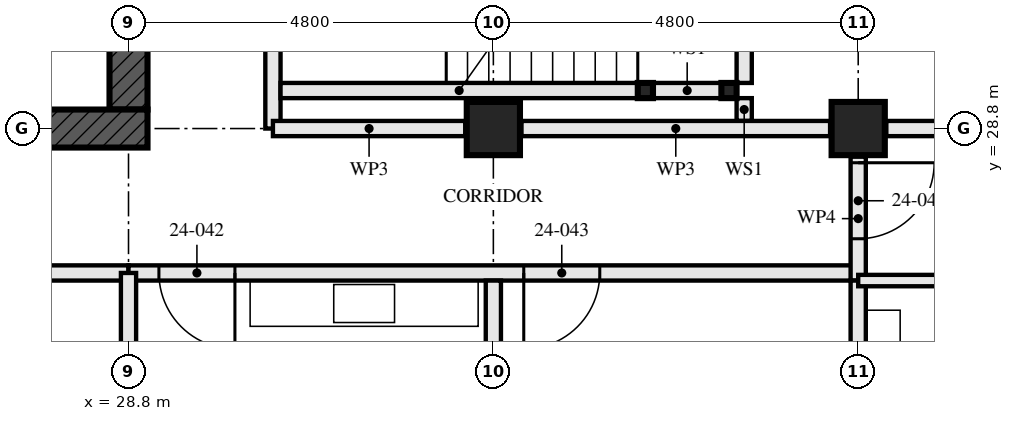
"""IFC4 building model, lengths in metres.
Left out: names, types, materials, properties, quantities, classifications, styles, units other than length and angle.
Written with IfcOpenShell. Run it as: python <this file> out.ifc"""

import sys

from ifc_helpers import new_model, si_unit, direction, frame, frame_2d, origin, origin_2d, place, context, subcontext, project, spatial, rectangle, hollow_rectangle, extrude, element, fill, save


model = new_model("IFC4")
c1 = context("Model", 3, precision=1e-05, world=origin(), true_north=direction((0.0, 1.0)))
c2 = subcontext(c1, "Body", "Model", "MODEL_VIEW")
j1 = project(units=[si_unit("LENGTHUNIT", "METRE"), si_unit("PLANEANGLEUNIT", "RADIAN")], contexts=[c1])
p1 = place(None, origin())
s1 = spatial("IfcSite", under=j1, at=p1, CompositionType="ELEMENT")
p2 = place(p1, origin())
s2 = spatial("IfcBuilding", under=s1, at=p2, CompositionType="ELEMENT")
p3 = place(p2, frame((0.0, 0.0, 91.0)))
s3 = spatial("IfcBuildingStorey", under=s2, at=p3, CompositionType="ELEMENT", Elevation=91.0)
for number, where, z_axis, x_axis in (
    (1, (33.6, 28.8, 0.0), (0.0, 0.0, 1.0), (0.0, 1.0, 0.0)),
    (2, (38.4, 28.8, 0.0), (0.0, 0.0, 1.0), (0.0, 1.0, 0.0)),
):
    element("IfcColumn", number, at=place(p3, frame(where, z_axis=z_axis, x_axis=x_axis)), inside=s3, PredefinedType="COLUMN", context=c2, shape_type="SweptSolid", body=[
        extrude(hollow_rectangle(XDim=0.7, YDim=0.7, WallThickness=0.06, at=origin_2d()), origin(), (0.0, 0.0, 1.0), 3.5),
    ])
p4 = place(p3, frame((14.15, 28.8, -0.17), z_axis=(0.0, 0.0, 1.0), x_axis=(1.0, 0.0, 0.0)))
e3 = element("IfcWall", 3, at=p4, inside=s3, PredefinedType="SHEAR", context=c2, shape_type="SweptSolid", body=[
    extrude(rectangle(XDim=14.9, YDim=0.5, at=frame_2d((7.45, 0.0))), origin(), (0.0, 0.0, 1.0), 3.5),
])
p5 = place(p4, frame((6.85, 0.0, 0.17)))
e4 = element("IfcOpeningElement", 4, at=p5, cuts=e3, PredefinedType="OPENING", context=c2, shape_type="SweptSolid", body=[
    extrude(rectangle(XDim=1.2, YDim=2.1, at=frame_2d((0.6, 1.05))), frame((0.0, 0.26, 0.0), z_axis=(0.0, -1.0, 0.0), x_axis=(1.0, 0.0, 0.0)), (0.0, 0.0, 1.0), 0.521),
])
p6 = place(p3, frame((28.8, 29.05, -0.17), z_axis=(0.0, 0.0, 1.0), x_axis=(0.0, 1.0, 0.0)))
e5 = element("IfcWall", 5, at=p6, inside=s3, PredefinedType="SHEAR", context=c2, shape_type="SweptSolid", body=[
    extrude(rectangle(XDim=13.9, YDim=0.5, at=frame_2d((6.95, 0.0))), origin(), (0.0, 0.0, 1.0), 3.5),
])
p7 = place(p6, frame((6.35, 0.0, 0.17)))
e6 = element("IfcOpeningElement", 6, at=p7, cuts=e5, PredefinedType="OPENING", context=c2, shape_type="SweptSolid", body=[
    extrude(rectangle(XDim=1.2, YDim=2.1, at=frame_2d((0.6, 1.05))), frame((0.0, 0.26, 0.0), z_axis=(0.0, -1.0, 0.0), x_axis=(1.0, 0.0, 0.0)), (0.0, 0.0, 1.0), 0.521),
])
for number, where, z_axis, x_axis in (
    (7, (36.7, 29.3, 0.0), (0.0, 0.0, 1.0), (1.0, 0.0, 0.0)),
    (8, (35.6, 29.3, 0.0), (0.0, 0.0, 1.0), (1.0, 0.0, 0.0)),
):
    element("IfcColumn", number, at=place(p3, frame(where, z_axis=z_axis, x_axis=x_axis)), inside=s3, PredefinedType="COLUMN", context=c2, shape_type="SweptSolid", body=[
        extrude(hollow_rectangle(XDim=0.2, YDim=0.2, WallThickness=0.008, at=origin_2d()), origin(), (0.0, 0.0, 1.0), 3.33),
    ])
p8 = place(p3, frame((13.96, 26.9, 0.0), z_axis=(0.0, 0.0, 1.0), x_axis=(1.0, 0.0, 0.0)))
e9 = element("IfcWall", 9, at=p8, inside=s3, PredefinedType="PARTITIONING", context=c2, shape_type="SweptSolid", body=[
    extrude(rectangle(XDim=14.84, YDim=0.2, at=frame_2d((7.42, 0.0))), origin(), (0.0, 0.0, 1.0), 2.32),
])
p9 = place(p8, frame((1.84, 0.0, 0.0)))
e10 = element("IfcOpeningElement", 10, at=p9, cuts=e9, PredefinedType="OPENING", context=c2, shape_type="SweptSolid", body=[
    extrude(rectangle(XDim=1.0, YDim=2.1, at=frame_2d((0.5, 1.05))), frame((0.0, 0.111, 0.0), z_axis=(0.0, -1.0, 0.0), x_axis=(1.0, 0.0, 0.0)), (0.0, 0.0, 1.0), 0.221),
])
p10 = place(p8, frame((4.09, 0.0, 0.0)))
e11 = element("IfcOpeningElement", 11, at=p10, cuts=e9, PredefinedType="OPENING", context=c2, shape_type="SweptSolid", body=[
    extrude(rectangle(XDim=0.9, YDim=2.1, at=frame_2d((0.45, 1.05))), frame((0.0, 0.111, 0.0), z_axis=(0.0, -1.0, 0.0), x_axis=(1.0, 0.0, 0.0)), (0.0, 0.0, 1.0), 0.221),
])
p11 = place(p8, frame((5.64, 0.0, 0.0)))
e12 = element("IfcOpeningElement", 12, at=p11, cuts=e9, PredefinedType="OPENING", context=c2, shape_type="SweptSolid", body=[
    extrude(rectangle(XDim=1.0, YDim=2.1, at=frame_2d((0.5, 1.05))), frame((0.0, 0.111, 0.0), z_axis=(0.0, -1.0, 0.0), x_axis=(1.0, 0.0, 0.0)), (0.0, 0.0, 1.0), 0.221),
])
p12 = place(p8, frame((10.44, 0.0, 0.0)))
e13 = element("IfcOpeningElement", 13, at=p12, cuts=e9, PredefinedType="OPENING", context=c2, shape_type="SweptSolid", body=[
    extrude(rectangle(XDim=1.0, YDim=2.1, at=frame_2d((0.5, 1.05))), frame((0.0, 0.111, 0.0), z_axis=(0.0, -1.0, 0.0), x_axis=(1.0, 0.0, 0.0)), (0.0, 0.0, 1.0), 0.221),
])
p13 = place(p3, frame((33.6, 14.647, 0.0), z_axis=(0.0, 0.0, 1.0), x_axis=(0.0, 1.0, 0.0)))
e14 = element("IfcWall", 14, at=p13, inside=s3, PredefinedType="PARTITIONING", context=c2, shape_type="SweptSolid", body=[
    extrude(rectangle(XDim=12.153, YDim=0.2, at=frame_2d((6.077, 0.0))), origin(), (0.0, 0.0, 1.0), 2.55),
])
p14 = place(p3, frame((38.4, 19.52, 0.0), z_axis=(0.0, 0.0, 1.0), x_axis=(0.0, 1.0, 0.0)))
e15 = element("IfcWall", 15, at=p14, inside=s3, PredefinedType="PARTITIONING", context=c2, shape_type="SweptSolid", body=[
    extrude(rectangle(XDim=7.28, YDim=0.2, at=frame_2d((3.64, 0.0))), origin(), (0.0, 0.0, 1.0), 2.55),
])
p15 = place(p3, frame((38.4, 26.8, 0.0), z_axis=(0.0, 0.0, 1.0), x_axis=(1.0, 0.0, 0.0)))
e16 = element("IfcWall", 16, at=p15, inside=s3, PredefinedType="PARTITIONING", context=c2, shape_type="SweptSolid", body=[
    extrude(rectangle(XDim=2.8, YDim=0.15, at=frame_2d((1.4, 0.0))), origin(), (0.0, 0.0, 1.0), 3.33),
])
p16 = place(p3, frame((28.8, 26.9, 0.0), z_axis=(0.0, 0.0, 1.0), x_axis=(1.0, 0.0, 0.0)))
e17 = element("IfcWall", 17, at=p16, inside=s3, PredefinedType="PARTITIONING", context=c2, shape_type="SweptSolid", body=[
    extrude(rectangle(XDim=9.6, YDim=0.2, at=frame_2d((4.8, 0.0))), origin(), (0.0, 0.0, 1.0), 3.33),
])
p17 = place(p16, frame((0.4, 0.0, 0.0)))
e18 = element("IfcOpeningElement", 18, at=p17, cuts=e17, PredefinedType="OPENING", context=c2, shape_type="SweptSolid", body=[
    extrude(rectangle(XDim=1.0, YDim=2.1, at=frame_2d((0.5, 1.05))), frame((0.0, 0.111, 0.0), z_axis=(0.0, -1.0, 0.0), x_axis=(1.0, 0.0, 0.0)), (0.0, 0.0, 1.0), 0.221),
])
p18 = place(p16, frame((5.2, 0.0, 0.0)))
e19 = element("IfcOpeningElement", 19, at=p18, cuts=e17, PredefinedType="OPENING", context=c2, shape_type="SweptSolid", body=[
    extrude(rectangle(XDim=1.0, YDim=2.1, at=frame_2d((0.5, 1.05))), frame((0.0, 0.111, 0.0), z_axis=(0.0, -1.0, 0.0), x_axis=(1.0, 0.0, 0.0)), (0.0, 0.0, 1.0), 0.221),
])
p19 = place(p3, frame((38.4, 26.8, 0.0), z_axis=(0.0, 0.0, 1.0), x_axis=(0.0, 1.0, 0.0)))
e20 = element("IfcWall", 20, at=p19, inside=s3, PredefinedType="PARTITIONING", context=c2, shape_type="SweptSolid", body=[
    extrude(rectangle(XDim=1.63, YDim=0.2, at=frame_2d((0.815, 0.0))), origin(), (0.0, 0.0, 1.0), 3.33),
])
p20 = place(p19, frame((0.55, 0.0, 0.0)))
e21 = element("IfcOpeningElement", 21, at=p20, cuts=e20, PredefinedType="OPENING", context=c2, shape_type="SweptSolid", body=[
    extrude(rectangle(XDim=1.0, YDim=2.1, at=frame_2d((0.5, 1.05))), frame((0.0, 0.111, 0.0), z_axis=(0.0, -1.0, 0.0), x_axis=(1.0, 0.0, 0.0)), (0.0, 0.0, 1.0), 0.221),
])
p21 = place(p3, frame((36.6, 29.3, 0.0), z_axis=(0.0, 0.0, 1.0), x_axis=(-1.0, 0.0, 0.0)))
e22 = element("IfcWall", 22, at=p21, inside=s3, PredefinedType="SOLIDWALL", context=c2, shape_type="SweptSolid", body=[
    extrude(rectangle(XDim=0.9, YDim=0.2, at=frame_2d((0.45, 0.0))), origin(), (0.0, 0.0, 1.0), 2.99),
])
p22 = place(p3, frame((35.5, 29.3, 0.0), z_axis=(0.0, 0.0, 1.0), x_axis=(-1.0, 0.0, 0.0)))
e23 = element("IfcWall", 23, at=p22, inside=s3, PredefinedType="SOLIDWALL", context=c2, shape_type="SweptSolid", body=[
    extrude(rectangle(XDim=4.7, YDim=0.2, at=frame_2d((2.35, 0.0))), origin(), (0.0, 0.0, 1.0), 2.99),
])
p23 = place(p3, frame((36.9, 28.9, 0.0), z_axis=(0.0, 0.0, 1.0), x_axis=(0.0, 1.0, 0.0)))
e24 = element("IfcWall", 24, at=p23, inside=s3, PredefinedType="SOLIDWALL", context=c2, shape_type="SweptSolid", body=[
    extrude(rectangle(XDim=0.3, YDim=0.2, at=frame_2d((0.15, 0.0))), origin(), (0.0, 0.0, 1.0), 3.33),
])
p24 = place(p3, frame((36.9, 29.4, 0.0), z_axis=(0.0, 0.0, 1.0), x_axis=(0.0, 1.0, 0.0)))
e25 = element("IfcWall", 25, at=p24, inside=s3, PredefinedType="SOLIDWALL", context=c2, shape_type="SweptSolid", body=[
    extrude(rectangle(XDim=2.6, YDim=0.2, at=frame_2d((1.3, 0.0))), origin(), (0.0, 0.0, 1.0), 3.33),
])
p25 = place(p3, frame((30.7, 28.8, 0.0), z_axis=(0.0, 0.0, 1.0), x_axis=(0.0, 1.0, 0.0)))
e26 = element("IfcWall", 26, at=p25, inside=s3, PredefinedType="PARTITIONING", context=c2, shape_type="SweptSolid", body=[
    extrude(rectangle(XDim=14.84, YDim=0.2, at=frame_2d((7.42, 0.0))), origin(), (0.0, 0.0, 1.0), 2.32),
])
p26 = place(p25, frame((1.4, 0.0, 0.0)))
e27 = element("IfcOpeningElement", 27, at=p26, cuts=e26, PredefinedType="OPENING", context=c2, shape_type="SweptSolid", body=[
    extrude(rectangle(XDim=1.0, YDim=2.1, at=frame_2d((0.5, 1.05))), frame((0.0, 0.111, 0.0), z_axis=(0.0, -1.0, 0.0), x_axis=(1.0, 0.0, 0.0)), (0.0, 0.0, 1.0), 0.221),
])
p27 = place(p25, frame((4.1, 0.0, 0.0)))
e28 = element("IfcOpeningElement", 28, at=p27, cuts=e26, PredefinedType="OPENING", context=c2, shape_type="SweptSolid", body=[
    extrude(rectangle(XDim=1.0, YDim=2.1, at=frame_2d((0.5, 1.05))), frame((0.0, 0.111, 0.0), z_axis=(0.0, -1.0, 0.0), x_axis=(1.0, 0.0, 0.0)), (0.0, 0.0, 1.0), 0.221),
])
p28 = place(p25, frame((5.975, 0.0, 0.0)))
e29 = element("IfcOpeningElement", 29, at=p28, cuts=e26, PredefinedType="OPENING", context=c2, shape_type="SweptSolid", body=[
    extrude(rectangle(XDim=1.0, YDim=2.1, at=frame_2d((0.5, 1.05))), frame((0.0, 0.111, 0.0), z_axis=(0.0, -1.0, 0.0), x_axis=(1.0, 0.0, 0.0)), (0.0, 0.0, 1.0), 0.221),
])
p29 = place(p25, frame((13.0, 0.0, 0.0)))
e30 = element("IfcOpeningElement", 30, at=p29, cuts=e26, PredefinedType="OPENING", context=c2, shape_type="SweptSolid", body=[
    extrude(rectangle(XDim=1.0, YDim=2.1, at=frame_2d((0.5, 1.05))), frame((0.0, 0.111, 0.0), z_axis=(0.0, -1.0, 0.0), x_axis=(1.0, 0.0, 0.0)), (0.0, 0.0, 1.0), 0.221),
])
p30 = place(p3, frame((28.8, 24.37, 0.0), z_axis=(0.0, 0.0, 1.0), x_axis=(0.0, 1.0, 0.0)))
e31 = element("IfcWall", 31, at=p30, inside=s3, PredefinedType="PARTITIONING", context=c2, shape_type="SweptSolid", body=[
    extrude(rectangle(XDim=2.53, YDim=0.2, at=frame_2d((1.265, 0.0))), origin(), (0.0, 0.0, 1.0), 2.32),
])
p31 = place(p3, frame((42.896, 28.8, 0.0), z_axis=(0.0, 0.0, 1.0), x_axis=(-1.0, 0.0, 0.0)))
e32 = element("IfcWall", 32, at=p31, inside=s3, PredefinedType="PARTITIONING", context=c2, shape_type="SweptSolid", body=[
    extrude(rectangle(XDim=4.125, YDim=0.2, at=frame_2d((2.063, 0.0))), origin(), (0.0, 0.0, 1.0), 2.32),
])
p32 = place(p3, frame((38.03, 28.8, 0.0), z_axis=(0.0, 0.0, 1.0), x_axis=(-1.0, 0.0, 0.0)))
e33 = element("IfcWall", 33, at=p32, inside=s3, PredefinedType="PARTITIONING", context=c2, shape_type="SweptSolid", body=[
    extrude(rectangle(XDim=4.06, YDim=0.2, at=frame_2d((2.03, 0.0))), origin(), (0.0, 0.0, 1.0), 2.32),
])
p33 = place(p3, frame((33.23, 28.8, 0.0), z_axis=(0.0, 0.0, 1.0), x_axis=(-1.0, 0.0, 0.0)))
e34 = element("IfcWall", 34, at=p33, inside=s3, PredefinedType="PARTITIONING", context=c2, shape_type="SweptSolid", body=[
    extrude(rectangle(XDim=2.53, YDim=0.2, at=frame_2d((1.265, 0.0))), origin(), (0.0, 0.0, 1.0), 2.32),
])
p34 = place(p17, frame((1.0, 0.0, 0.0), z_axis=(0.0, 0.0, 1.0), x_axis=(-1.0, 0.0, 0.0)))
e35 = element("IfcDoor", 35, at=p34, inside=s3, OperationType="SINGLE_SWING_RIGHT", PredefinedType="DOOR", context=c2, shape_type="SweptSolid", body=[
    extrude(rectangle(XDim=1.0, YDim=2.1, at=frame_2d((0.5, 1.05))), frame((0.0, 0.027, 0.0), z_axis=(0.0, -1.0, 0.0), x_axis=(1.0, 0.0, 0.0)), (0.0, 0.0, 1.0), 0.054),
])
fill(e18, e35)
p35 = place(p18, frame((1.0, 0.0, 0.0), z_axis=(0.0, 0.0, 1.0), x_axis=(-1.0, 0.0, 0.0)))
e36 = element("IfcDoor", 36, at=p35, inside=s3, OperationType="SINGLE_SWING_LEFT", PredefinedType="DOOR", context=c2, shape_type="SweptSolid", body=[
    extrude(rectangle(XDim=1.0, YDim=2.1, at=frame_2d((0.5, 1.05))), frame((0.0, 0.027, 0.0), z_axis=(0.0, -1.0, 0.0), x_axis=(1.0, 0.0, 0.0)), (0.0, 0.0, 1.0), 0.054),
])
fill(e19, e36)
p36 = place(p20, frame((1.0, 0.0, 0.0), z_axis=(0.0, 0.0, 1.0), x_axis=(-1.0, 0.0, 0.0)))
e37 = element("IfcDoor", 37, at=p36, inside=s3, OperationType="SINGLE_SWING_RIGHT", PredefinedType="DOOR", context=c2, shape_type="SweptSolid", body=[
    extrude(rectangle(XDim=1.0, YDim=2.1, at=frame_2d((0.5, 1.05))), frame((0.0, 0.027, 0.0), z_axis=(0.0, -1.0, 0.0), x_axis=(1.0, 0.0, 0.0)), (0.0, 0.0, 1.0), 0.054),
])
fill(e21, e37)
save(model, sys.argv[1])
